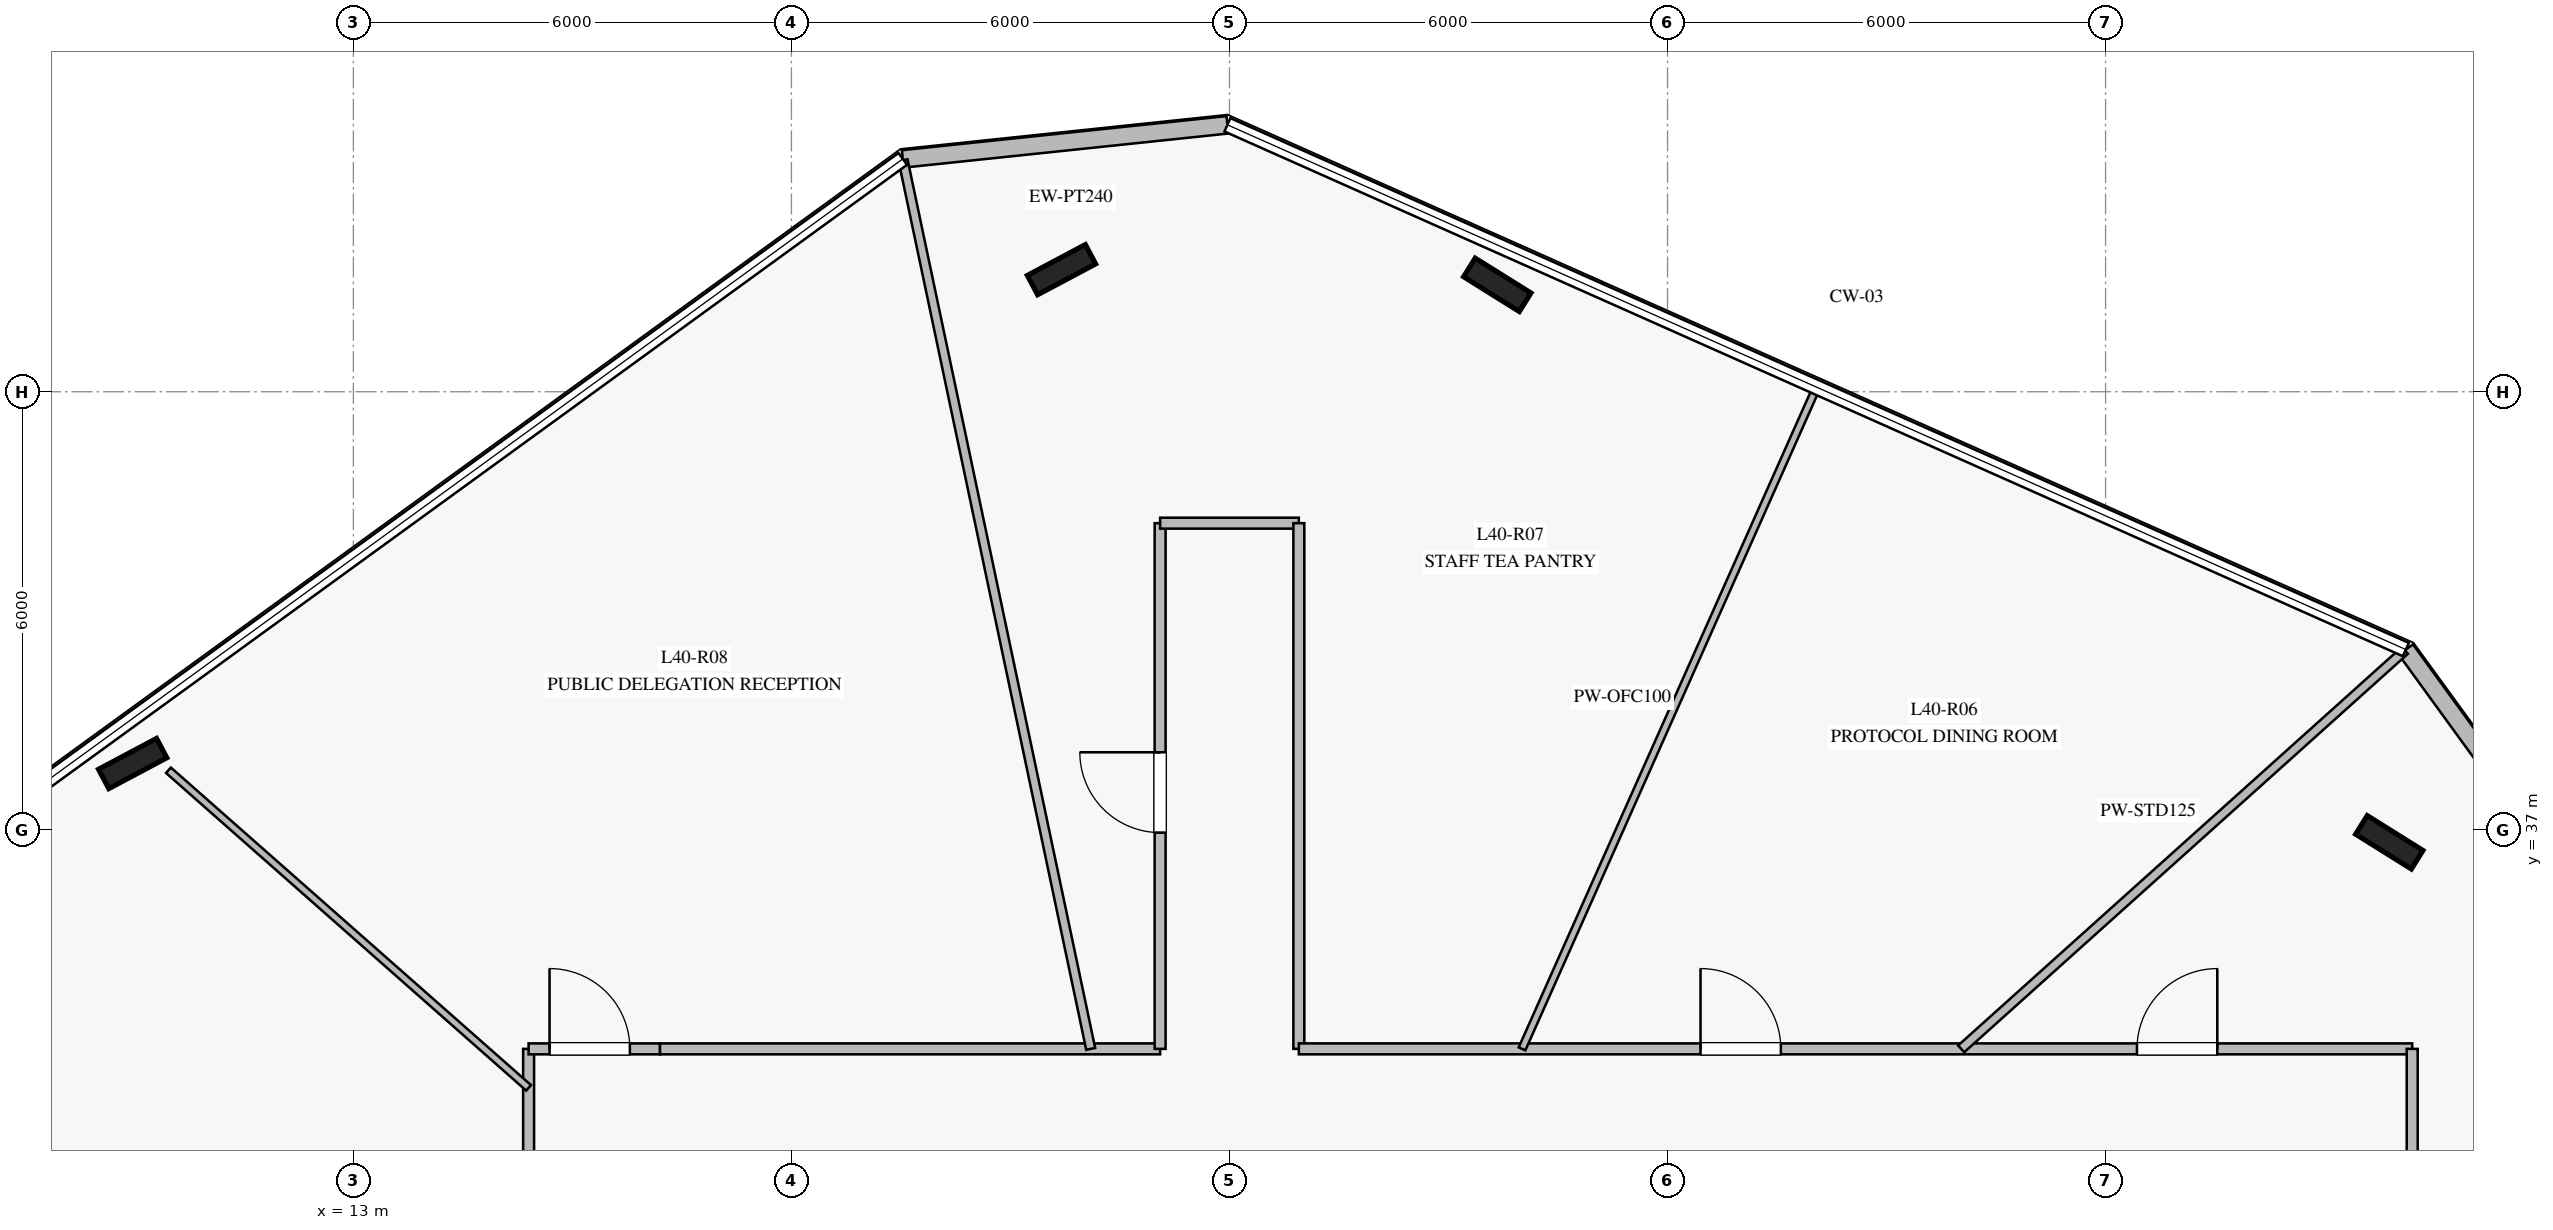
"""IFC4 building model, lengths in metres.
Left out: names, types, materials, properties, quantities, classifications, styles, units other than length and angle.
Written with IfcOpenShell. Run it as: python <this file> out.ifc"""

import sys

from ifc_helpers import new_model, si_unit, direction, frame, frame_2d, origin, origin_2d, place, context, subcontext, project, spatial, rectangle, i_section, extrude, element, fill, save


model = new_model("IFC4")
c1 = context("Model", 3, precision=1e-05, world=origin(), true_north=direction((0.0, 1.0)))
c2 = subcontext(c1, "Body", "Model", "MODEL_VIEW")
j1 = project(units=[si_unit("LENGTHUNIT", "METRE"), si_unit("PLANEANGLEUNIT", "RADIAN")], contexts=[c1])
p1 = place(None, origin())
s1 = spatial("IfcSite", under=j1, at=p1, CompositionType="ELEMENT")
p2 = place(p1, origin())
s2 = spatial("IfcBuilding", under=s1, at=p2, CompositionType="ELEMENT")
p3 = place(p2, frame((0.0, 0.0, 166.4)))
s3 = spatial("IfcBuildingStorey", under=s2, at=p3, CompositionType="ELEMENT", Elevation=166.4)
for number, where, z_axis, x_axis in (
    (1, (40.886, 36.829, 0.0), (0.0, 0.0, 1.0), (-0.848, 0.53, 0.0)),
    (2, (28.668, 44.464, 0.0), (0.0, 0.0, 1.0), (-0.848, 0.53, 0.0)),
    (3, (22.699, 44.672, 0.0), (0.0, 0.0, 1.0), (0.883, 0.469, 0.0)),
    (4, (9.977, 37.908, 0.0), (0.0, 0.0, 1.0), (0.883, 0.469, 0.0)),
):
    element("IfcColumn", number, at=place(p3, frame(where, z_axis=z_axis, x_axis=x_axis)), inside=s3, PredefinedType="COLUMN", context=c2, shape_type="SweptSolid", body=[
        extrude(i_section(OverallWidth=0.3, OverallDepth=0.9, WebThickness=0.019, FlangeThickness=0.035, at=origin_2d()), origin(), (0.0, 0.0, 1.0), 4.0),
    ])
p4 = place(p3, frame((24.972, 46.656, 0.0), z_axis=(0.0, 0.0, 1.0), x_axis=(-0.994530256506, -0.104448881729, 0.0)))
e5 = element("IfcWall", 5, at=p4, inside=s3, PredefinedType="STANDARD", context=c2, shape_type="SweptSolid", body=[
    extrude(rectangle(XDim=4.471, YDim=0.24, at=frame_2d((2.236, 0.0))), origin(), (0.0, 0.0, 1.0), 3.7),
])
p5 = place(p3, frame((43.741, 35.853, 0.0), z_axis=(0.0, 0.0, 1.0), x_axis=(-0.587898873753, 0.80893443136, 0.0)))
e6 = element("IfcWall", 6, at=p5, inside=s3, PredefinedType="STANDARD", context=c2, shape_type="SweptSolid", body=[
    extrude(rectangle(XDim=4.47, YDim=0.24, at=frame_2d((2.235, 0.0))), origin(), (0.0, 0.0, 1.0), 3.7),
])
p6 = place(p3, frame((15.4, 32.2, 0.0), z_axis=(0.0, 0.0, 1.0), x_axis=(0.0, 1.0, 0.0)))
e7 = element("IfcWall", 7, at=p6, inside=s3, PredefinedType="PARTITIONING", context=c2, shape_type="SweptSolid", body=[
    extrude(rectangle(XDim=1.8, YDim=0.15, at=frame_2d((0.9, 0.0))), origin(), (0.0, 0.0, 1.0), 3.15),
])
p7 = place(p3, frame((15.4, 34.0, 0.0), z_axis=(0.0, 0.0, 1.0), x_axis=(1.0, 0.0, 0.0)))
e8 = element("IfcWall", 8, at=p7, inside=s3, PredefinedType="PARTITIONING", context=c2, shape_type="SweptSolid", body=[
    extrude(rectangle(XDim=1.8, YDim=0.15, at=frame_2d((0.9, 0.0))), origin(), (0.0, 0.0, 1.0), 3.7),
])
p8 = place(p7, frame((0.287, 0.0, 0.0)))
e9 = element("IfcOpeningElement", 9, at=p8, cuts=e8, PredefinedType="OPENING", context=c2, shape_type="SweptSolid", body=[
    extrude(rectangle(XDim=1.1, YDim=2.2, at=frame_2d((0.55, 1.1))), frame((0.0, 0.085, 0.0), z_axis=(0.0, -1.0, 0.0), x_axis=(1.0, 0.0, 0.0)), (0.0, 0.0, 1.0), 0.17),
])
p9 = place(p3, frame((17.2, 34.0, 0.0), z_axis=(0.0, 0.0, 1.0), x_axis=(1.0, 0.0, 0.0)))
e10 = element("IfcWall", 10, at=p9, inside=s3, PredefinedType="PARTITIONING", context=c2, shape_type="SweptSolid", body=[
    extrude(rectangle(XDim=6.85, YDim=0.15, at=frame_2d((3.425, 0.0))), origin(), (0.0, 0.0, 1.0), 3.15),
])
p10 = place(p3, frame((24.05, 34.0, 0.0), z_axis=(0.0, 0.0, 1.0), x_axis=(0.0, 1.0, 0.0)))
e11 = element("IfcWall", 11, at=p10, inside=s3, PredefinedType="PARTITIONING", context=c2, shape_type="SweptSolid", body=[
    extrude(rectangle(XDim=7.2, YDim=0.15, at=frame_2d((3.6, 0.0))), origin(), (0.0, 0.0, 1.0), 3.3),
])
p11 = place(p10, frame((2.962, 0.0, 0.0)))
e12 = element("IfcOpeningElement", 12, at=p11, cuts=e11, PredefinedType="OPENING", context=c2, shape_type="SweptSolid", body=[
    extrude(rectangle(XDim=1.1, YDim=2.2, at=frame_2d((0.55, 1.1))), frame((0.0, 0.085, 0.0), z_axis=(0.0, -1.0, 0.0), x_axis=(1.0, 0.0, 0.0)), (0.0, 0.0, 1.0), 0.17),
])
p12 = place(p3, frame((24.05, 41.2, 0.0), z_axis=(0.0, 0.0, 1.0), x_axis=(1.0, 0.0, 0.0)))
e13 = element("IfcWall", 13, at=p12, inside=s3, PredefinedType="PARTITIONING", context=c2, shape_type="SweptSolid", body=[
    extrude(rectangle(XDim=1.9, YDim=0.15, at=frame_2d((0.95, 0.0))), origin(), (0.0, 0.0, 1.0), 3.7),
])
p13 = place(p3, frame((25.95, 41.2, 0.0), z_axis=(0.0, 0.0, 1.0), x_axis=(0.0, -1.0, 0.0)))
e14 = element("IfcWall", 14, at=p13, inside=s3, PredefinedType="PARTITIONING", context=c2, shape_type="SweptSolid", body=[
    extrude(rectangle(XDim=7.2, YDim=0.15, at=frame_2d((3.6, 0.0))), origin(), (0.0, 0.0, 1.0), 3.3),
])
p14 = place(p3, frame((25.95, 34.0, 0.0), z_axis=(0.0, 0.0, 1.0), x_axis=(1.0, 0.0, 0.0)))
e15 = element("IfcWall", 15, at=p14, inside=s3, PredefinedType="PARTITIONING", context=c2, shape_type="SweptSolid", body=[
    extrude(rectangle(XDim=15.25, YDim=0.15, at=frame_2d((7.625, 0.0))), origin(), (0.0, 0.0, 1.0), 3.15),
])
p15 = place(p14, frame((11.48, 0.0, 0.0)))
e16 = element("IfcOpeningElement", 16, at=p15, cuts=e15, PredefinedType="OPENING", context=c2, shape_type="SweptSolid", body=[
    extrude(rectangle(XDim=1.1, YDim=2.2, at=frame_2d((0.55, 1.1))), frame((0.0, 0.085, 0.0), z_axis=(0.0, -1.0, 0.0), x_axis=(1.0, 0.0, 0.0)), (0.0, 0.0, 1.0), 0.17),
])
p16 = place(p14, frame((5.502, 0.0, 0.0)))
e17 = element("IfcOpeningElement", 17, at=p16, cuts=e15, PredefinedType="OPENING", context=c2, shape_type="SweptSolid", body=[
    extrude(rectangle(XDim=1.1, YDim=2.2, at=frame_2d((0.55, 1.1))), frame((0.0, 0.085, 0.0), z_axis=(0.0, -1.0, 0.0), x_axis=(1.0, 0.0, 0.0)), (0.0, 0.0, 1.0), 0.17),
])
p17 = place(p3, frame((41.2, 34.0, 0.0), z_axis=(0.0, 0.0, 1.0), x_axis=(0.0, -1.0, 0.0)))
e18 = element("IfcWall", 18, at=p17, inside=s3, PredefinedType="PARTITIONING", context=c2, shape_type="SweptSolid", body=[
    extrude(rectangle(XDim=1.8, YDim=0.15, at=frame_2d((0.9, 0.0))), origin(), (0.0, 0.0, 1.0), 3.7),
])
p18 = place(p3, frame((35.022, 34.0, 0.0), z_axis=(0.0, 0.0, 1.0), x_axis=(0.744048711529, 0.668125373618, 0.0)))
e19 = element("IfcWall", 19, at=p18, inside=s3, PredefinedType="PARTITIONING", context=c2, shape_type="SweptSolid", body=[
    extrude(rectangle(XDim=8.168, YDim=0.125, at=frame_2d((4.084, 0.0))), origin(), (0.0, 0.0, 1.0), 3.1),
])
p19 = place(p3, frame((29.007, 34.0, 0.0), z_axis=(0.0, 0.0, 1.0), x_axis=(0.406801666568, 0.913516504546, 0.0)))
e20 = element("IfcWall", 20, at=p19, inside=s3, PredefinedType="MOVABLE", context=c2, shape_type="SweptSolid", body=[
    extrude(rectangle(XDim=9.904, YDim=0.1, at=frame_2d((4.952, 0.0))), origin(), (0.0, 0.0, 1.0), 3.1),
])
p20 = place(p3, frame((23.099, 34.0, 0.0), z_axis=(0.0, 0.0, 1.0), x_axis=(-0.20660887061, 0.978423617144, 0.0)))
e21 = element("IfcWall", 21, at=p20, inside=s3, PredefinedType="PARTITIONING", context=c2, shape_type="SweptSolid", body=[
    extrude(rectangle(XDim=12.439, YDim=0.125, at=frame_2d((6.22, 0.0))), origin(), (0.0, 0.0, 1.0), 3.1),
])
p21 = place(p3, frame((15.4, 33.466, 0.0), z_axis=(0.0, 0.0, 1.0), x_axis=(-0.750039316512, 0.66139324436, 0.0)))
e22 = element("IfcWall", 22, at=p21, inside=s3, PredefinedType="MOVABLE", context=c2, shape_type="SweptSolid", body=[
    extrude(rectangle(XDim=6.577, YDim=0.1, at=frame_2d((3.289, 0.0))), origin(), (0.0, 0.0, 1.0), 3.15),
])
p22 = place(p15, origin())
e23 = element("IfcDoor", 23, at=p22, inside=s3, OperationType="SINGLE_SWING_RIGHT", PredefinedType="DOOR", context=c2, shape_type="SweptSolid", body=[
    extrude(rectangle(XDim=1.1, YDim=2.2, at=frame_2d((0.55, 1.1))), frame((0.0, 0.025, 0.0), z_axis=(0.0, -1.0, 0.0), x_axis=(1.0, 0.0, 0.0)), (0.0, 0.0, 1.0), 0.05),
])
fill(e16, e23)
p23 = place(p16, origin())
e24 = element("IfcDoor", 24, at=p23, inside=s3, OperationType="SINGLE_SWING_LEFT", PredefinedType="DOOR", context=c2, shape_type="SweptSolid", body=[
    extrude(rectangle(XDim=1.1, YDim=2.2, at=frame_2d((0.55, 1.1))), frame((0.0, 0.025, 0.0), z_axis=(0.0, -1.0, 0.0), x_axis=(1.0, 0.0, 0.0)), (0.0, 0.0, 1.0), 0.05),
])
fill(e17, e24)
p24 = place(p11, origin())
e25 = element("IfcDoor", 25, at=p24, inside=s3, OperationType="SINGLE_SWING_RIGHT", PredefinedType="DOOR", context=c2, shape_type="SweptSolid", body=[
    extrude(rectangle(XDim=1.1, YDim=2.2, at=frame_2d((0.55, 1.1))), frame((0.0, 0.025, 0.0), z_axis=(0.0, -1.0, 0.0), x_axis=(1.0, 0.0, 0.0)), (0.0, 0.0, 1.0), 0.05),
])
fill(e12, e25)
p25 = place(p8, origin())
e26 = element("IfcDoor", 26, at=p25, inside=s3, OperationType="SINGLE_SWING_LEFT", PredefinedType="DOOR", context=c2, shape_type="SweptSolid", body=[
    extrude(rectangle(XDim=1.1, YDim=2.2, at=frame_2d((0.55, 1.1))), frame((0.0, 0.025, 0.0), z_axis=(0.0, -1.0, 0.0), x_axis=(1.0, 0.0, 0.0)), (0.0, 0.0, 1.0), 0.05),
])
fill(e9, e26)
save(model, sys.argv[1])
